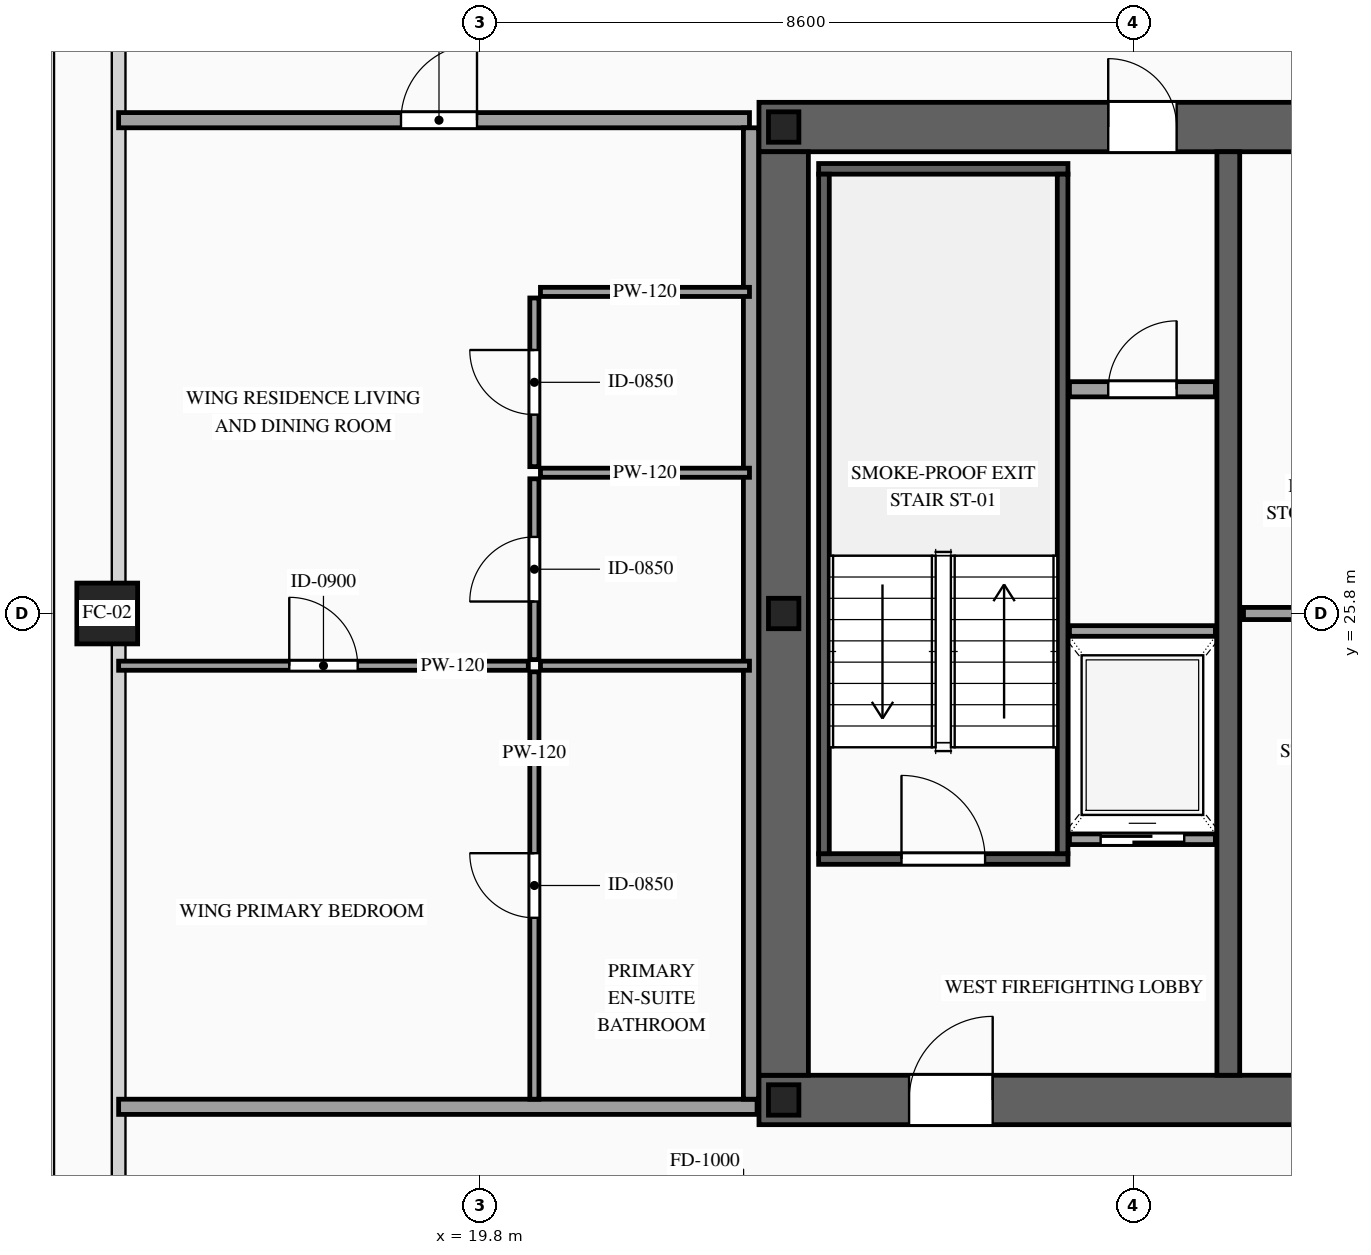
"""IFC4 building model, lengths in metres.
Left out: names, types, materials, properties, quantities, classifications, styles, units other than length and angle.
Written with IfcOpenShell. Run it as: python <this file> out.ifc"""

import sys

from ifc_helpers import new_model, si_unit, direction, frame, frame_2d, origin, origin_2d, place, context, subcontext, project, spatial, rectangle, hollow_rectangle, i_section, extrude, source, transform, mapped, element, fill, save


model = new_model("IFC4")
c1 = context("Model", 3, precision=1e-05, world=origin(), true_north=direction((0.0, 1.0)))
c2 = subcontext(c1, "Body", "Model", "MODEL_VIEW")
j1 = project(units=[si_unit("LENGTHUNIT", "METRE"), si_unit("PLANEANGLEUNIT", "RADIAN")], contexts=[c1])
p1 = place(None, origin())
s1 = spatial("IfcSite", under=j1, at=p1, CompositionType="ELEMENT")
p2 = place(p1, origin())
s2 = spatial("IfcBuilding", under=s1, at=p2, CompositionType="ELEMENT")
p3 = place(p2, frame((0.0, 0.0, 181.0)))
s3 = spatial("IfcBuildingStorey", under=s2, at=p3, CompositionType="ELEMENT", Elevation=181.0)
p4 = place(p3, frame((23.475, 19.4, 0.0), z_axis=(0.0, 0.0, 1.0), x_axis=(1.0, 0.0, 0.0)))
e1 = element("IfcWall", 1, at=p4, inside=s3, PredefinedType="SHEAR", context=c2, shape_type="SweptSolid", body=[
    extrude(rectangle(XDim=27.05, YDim=0.65, at=frame_2d((13.525, 0.0))), origin(), (0.0, 0.0, 1.0), 3.5),
])
p5 = place(p4, frame((1.975, 0.0, 0.0)))
e2 = element("IfcOpeningElement", 2, at=p5, cuts=e1, PredefinedType="OPENING", context=c2, shape_type="SweptSolid", body=[
    extrude(rectangle(XDim=1.1, YDim=2.2, at=frame_2d((0.55, 1.1))), frame((0.0, 0.34, 0.0), z_axis=(0.0, -1.0, 0.0), x_axis=(1.0, 0.0, 0.0)), (0.0, 0.0, 1.0), 0.68),
])
p6 = place(p4, frame((9.875, 0.0, 0.0)))
e3 = element("IfcOpeningElement", 3, at=p6, cuts=e1, PredefinedType="OPENING", context=c2, shape_type="SweptSolid", body=[
    extrude(rectangle(XDim=1.1, YDim=2.2, at=frame_2d((0.55, 1.1))), frame((0.0, 0.34, 0.0), z_axis=(0.0, -1.0, 0.0), x_axis=(1.0, 0.0, 0.0)), (0.0, 0.0, 1.0), 0.68),
])
p7 = place(p4, frame((23.075, 0.0, 0.0)))
e4 = element("IfcOpeningElement", 4, at=p7, cuts=e1, PredefinedType="OPENING", context=c2, shape_type="SweptSolid", body=[
    extrude(rectangle(XDim=1.1, YDim=2.2, at=frame_2d((0.55, 1.1))), frame((0.0, 0.34, 0.0), z_axis=(0.0, -1.0, 0.0), x_axis=(1.0, 0.0, 0.0)), (0.0, 0.0, 1.0), 0.68),
])
p8 = place(p4, frame((19.695, 0.0, 0.0)))
e5 = element("IfcOpeningElement", 5, at=p8, cuts=e1, PredefinedType="OPENING", context=c2, shape_type="SweptSolid", body=[
    extrude(rectangle(XDim=0.9, YDim=2.15, at=frame_2d((0.45, 1.075))), frame((0.0, 0.34, 0.0), z_axis=(0.0, -1.0, 0.0), x_axis=(1.0, 0.0, 0.0)), (0.0, 0.0, 1.0), 0.68),
])
p9 = place(p4, frame((18.255, 0.0, 0.0)))
e6 = element("IfcOpeningElement", 6, at=p9, cuts=e1, PredefinedType="OPENING", context=c2, shape_type="SweptSolid", body=[
    extrude(rectangle(XDim=0.9, YDim=2.15, at=frame_2d((0.45, 1.075))), frame((0.0, 0.34, 0.0), z_axis=(0.0, -1.0, 0.0), x_axis=(1.0, 0.0, 0.0)), (0.0, 0.0, 1.0), 0.68),
])
p10 = place(p3, frame((23.475, 32.2, 0.0), z_axis=(0.0, 0.0, 1.0), x_axis=(1.0, 0.0, 0.0)))
e7 = element("IfcWall", 7, at=p10, inside=s3, PredefinedType="SHEAR", context=c2, shape_type="SweptSolid", body=[
    extrude(rectangle(XDim=27.05, YDim=0.65, at=frame_2d((13.525, 0.0))), origin(), (0.0, 0.0, 1.0), 3.5),
])
p11 = place(p10, frame((4.595, 0.0, 0.0)))
e8 = element("IfcOpeningElement", 8, at=p11, cuts=e7, PredefinedType="OPENING", context=c2, shape_type="SweptSolid", body=[
    extrude(rectangle(XDim=0.9, YDim=2.15, at=frame_2d((0.45, 1.075))), frame((0.0, 0.34, 0.0), z_axis=(0.0, -1.0, 0.0), x_axis=(1.0, 0.0, 0.0)), (0.0, 0.0, 1.0), 0.68),
])
p12 = place(p10, frame((9.875, 0.0, 0.0)))
e9 = element("IfcOpeningElement", 9, at=p12, cuts=e7, PredefinedType="OPENING", context=c2, shape_type="SweptSolid", body=[
    extrude(rectangle(XDim=1.1, YDim=2.2, at=frame_2d((0.55, 1.1))), frame((0.0, 0.34, 0.0), z_axis=(0.0, -1.0, 0.0), x_axis=(1.0, 0.0, 0.0)), (0.0, 0.0, 1.0), 0.68),
])
p13 = place(p10, frame((15.725, 0.0, 0.0)))
e10 = element("IfcOpeningElement", 10, at=p13, cuts=e7, PredefinedType="OPENING", context=c2, shape_type="SweptSolid", body=[
    extrude(rectangle(XDim=1.1, YDim=2.2, at=frame_2d((0.55, 1.1))), frame((0.0, 0.34, 0.0), z_axis=(0.0, -1.0, 0.0), x_axis=(1.0, 0.0, 0.0)), (0.0, 0.0, 1.0), 0.68),
])
p14 = place(p10, frame((19.695, 0.0, 0.0)))
e11 = element("IfcOpeningElement", 11, at=p14, cuts=e7, PredefinedType="OPENING", context=c2, shape_type="SweptSolid", body=[
    extrude(rectangle(XDim=0.9, YDim=2.15, at=frame_2d((0.45, 1.075))), frame((0.0, 0.34, 0.0), z_axis=(0.0, -1.0, 0.0), x_axis=(1.0, 0.0, 0.0)), (0.0, 0.0, 1.0), 0.68),
])
m1 = source(origin(), c2, "Body", "SweptSolid", [
    extrude(rectangle(XDim=12.15, YDim=0.65, at=frame_2d((6.075, 0.0))), origin(), (0.0, 0.0, 1.0), 3.5),
])
p15 = place(p3, frame((23.8, 19.725, 0.0), z_axis=(0.0, 0.0, 1.0), x_axis=(0.0, 1.0, 0.0)))
e12 = element("IfcWall", 12, at=p15, inside=s3, PredefinedType="SHEAR", context=c2, shape_type="MappedRepresentation", body=[
    mapped(m1, transform((0.0, 0.0, 0.0), scale=1.0)),
])
m2 = source(origin(), c2, "Body", "SweptSolid", [
    extrude(rectangle(XDim=12.15, YDim=0.3, at=frame_2d((6.075, 0.0))), origin(), (0.0, 0.0, 1.0), 3.5),
])
p16 = place(p3, frame((29.65, 19.725, 0.0), z_axis=(0.0, 0.0, 1.0), x_axis=(0.0, 1.0, 0.0)))
e13 = element("IfcWall", 13, at=p16, inside=s3, PredefinedType="SOLIDWALL", context=c2, shape_type="MappedRepresentation", body=[
    mapped(m2, transform((0.0, 0.0, 0.0), scale=1.0)),
])
m3 = source(origin(), c2, "Body", "SweptSolid", [
    extrude(i_section(OverallWidth=0.4, OverallDepth=0.4, WebThickness=0.013, FlangeThickness=0.021, at=origin_2d()), origin(), (0.0, 0.0, 1.0), 3.5),
])
for number, where, z_axis, x_axis in (
    (14, (23.8, 19.4, 0.0), (0.0, 0.0, 1.0), (1.0, 0.0, 0.0)),
    (15, (23.8, 25.8, 0.0), (0.0, 0.0, 1.0), (1.0, 0.0, 0.0)),
    (16, (23.8, 32.2, 0.0), (0.0, 0.0, 1.0), (1.0, 0.0, 0.0)),
):
    element("IfcColumn", number, at=place(p3, frame(where, z_axis=z_axis, x_axis=x_axis)), inside=s3, PredefinedType="COLUMN", context=c2, shape_type="MappedRepresentation", body=[
        mapped(m3, transform((0.0, 0.0, 0.0), scale=1.0)),
    ])
m4 = source(origin(), c2, "Body", "SweptSolid", [
    extrude(hollow_rectangle(XDim=0.8, YDim=0.8, WallThickness=0.036, at=origin_2d()), origin(), (0.0, 0.0, 1.0), 3.5),
])
p17 = place(p3, frame((14.9, 25.8, 0.0), z_axis=(0.0, 0.0, 1.0), x_axis=(1.0, 0.0, 0.0)))
e17 = element("IfcColumn", 17, at=p17, inside=s3, PredefinedType="COLUMN", context=c2, shape_type="MappedRepresentation", body=[
    mapped(m4, transform((0.0, 0.0, 0.0), scale=1.0)),
])
p18 = place(p3, frame((27.56, 22.83, 0.0), z_axis=(0.0, 0.0, 1.0), x_axis=(1.0, 0.0, 0.0)))
e18 = element("IfcWall", 18, at=p18, inside=s3, PredefinedType="SOLIDWALL", context=c2, shape_type="SweptSolid", body=[
    extrude(rectangle(XDim=1.92, YDim=0.14, at=frame_2d((0.96, 0.0))), origin(), (0.0, 0.0, 1.0), 3.28),
])
p19 = place(p18, frame((0.41, 0.0, 0.0)))
e19 = element("IfcOpeningElement", 19, at=p19, cuts=e18, PredefinedType="OPENING", context=c2, shape_type="SweptSolid", body=[
    extrude(rectangle(XDim=1.1, YDim=2.2, at=frame_2d((0.55, 1.1))), frame((0.0, 0.085, 0.0), z_axis=(0.0, -1.0, 0.0), x_axis=(1.0, 0.0, 0.0)), (0.0, 0.0, 1.0), 0.17),
])
m5 = source(origin(), c2, "Body", "SweptSolid", [
    extrude(rectangle(XDim=1.92, YDim=0.14, at=frame_2d((0.96, 0.0))), origin(), (0.0, 0.0, 1.0), 3.28),
])
p20 = place(p3, frame((27.56, 25.57, 0.0), z_axis=(0.0, 0.0, 1.0), x_axis=(1.0, 0.0, 0.0)))
e20 = element("IfcWall", 20, at=p20, inside=s3, PredefinedType="SOLIDWALL", context=c2, shape_type="MappedRepresentation", body=[
    mapped(m5, transform((0.0, 0.0, 0.0), scale=1.0)),
])
p21 = place(p3, frame((24.26, 22.57, 0.0), z_axis=(0.0, 0.0, 1.0), x_axis=(1.0, 0.0, 0.0)))
e21 = element("IfcWall", 21, at=p21, inside=s3, PredefinedType="SOLIDWALL", context=c2, shape_type="SweptSolid", body=[
    extrude(rectangle(XDim=3.28, YDim=0.14, at=frame_2d((1.64, 0.0))), origin(), (0.0, 0.0, 1.0), 3.28),
])
p22 = place(p21, frame((1.09, 0.0, 0.0)))
e22 = element("IfcOpeningElement", 22, at=p22, cuts=e21, PredefinedType="OPENING", context=c2, shape_type="SweptSolid", body=[
    extrude(rectangle(XDim=1.1, YDim=2.2, at=frame_2d((0.55, 1.1))), frame((0.0, 0.085, 0.0), z_axis=(0.0, -1.0, 0.0), x_axis=(1.0, 0.0, 0.0)), (0.0, 0.0, 1.0), 0.17),
])
m6 = source(origin(), c2, "Body", "SweptSolid", [
    extrude(rectangle(XDim=3.28, YDim=0.14, at=frame_2d((1.64, 0.0))), origin(), (0.0, 0.0, 1.0), 3.28),
])
p23 = place(p3, frame((24.26, 31.65, 0.0), z_axis=(0.0, 0.0, 1.0), x_axis=(1.0, 0.0, 0.0)))
e23 = element("IfcWall", 23, at=p23, inside=s3, PredefinedType="SOLIDWALL", context=c2, shape_type="MappedRepresentation", body=[
    mapped(m6, transform((0.0, 0.0, 0.0), scale=1.0)),
])
m7 = source(origin(), c2, "Body", "SweptSolid", [
    extrude(rectangle(XDim=8.94, YDim=0.14, at=frame_2d((4.47, 0.0))), origin(), (0.0, 0.0, 1.0), 3.28),
])
for number, where, z_axis, x_axis in (
    (24, (24.33, 22.64, 0.0), (0.0, 0.0, 1.0), (0.0, 1.0, 0.0)),
    (25, (27.47, 22.64, 0.0), (0.0, 0.0, 1.0), (0.0, 1.0, 0.0)),
):
    element("IfcWall", number, at=place(p3, frame(where, z_axis=z_axis, x_axis=x_axis)), inside=s3, PredefinedType="SOLIDWALL", context=c2, shape_type="MappedRepresentation", body=[
        mapped(m7, transform((0.0, 0.0, 0.0), scale=1.0)),
    ])
p24 = place(p3, frame((27.56, 28.75, 0.0), z_axis=(0.0, 0.0, 1.0), x_axis=(1.0, 0.0, 0.0)))
e26 = element("IfcWall", 26, at=p24, inside=s3, PredefinedType="PARTITIONING", context=c2, shape_type="SweptSolid", body=[
    extrude(rectangle(XDim=1.92, YDim=0.2, at=frame_2d((0.96, 0.0))), origin(), (0.0, 0.0, 1.0), 3.28),
])
p25 = place(p24, frame((0.51, 0.0, 0.0)))
e27 = element("IfcOpeningElement", 27, at=p25, cuts=e26, PredefinedType="OPENING", context=c2, shape_type="SweptSolid", body=[
    extrude(rectangle(XDim=0.9, YDim=2.15, at=frame_2d((0.45, 1.075))), frame((0.0, 0.115, 0.0), z_axis=(0.0, -1.0, 0.0), x_axis=(1.0, 0.0, 0.0)), (0.0, 0.0, 1.0), 0.23),
])
m8 = source(origin(), c2, "Body", "SweptSolid", [
    extrude(rectangle(XDim=2.47, YDim=0.16, at=frame_2d((1.235, 0.0))), origin(), (0.0, 0.0, 1.0), 3.28),
])
p26 = place(p3, frame((29.85, 25.8, 0.0), z_axis=(0.0, 0.0, 1.0), x_axis=(1.0, 0.0, 0.0)))
e28 = element("IfcWall", 28, at=p26, inside=s3, PredefinedType="PARTITIONING", context=c2, shape_type="MappedRepresentation", body=[
    mapped(m8, transform((0.0, 0.0, 0.0), scale=1.0)),
])
p27 = place(p3, frame((15.05, 32.29, 0.0), z_axis=(0.0, 0.0, 1.0), x_axis=(1.0, 0.0, 0.0)))
e29 = element("IfcWall", 29, at=p27, inside=s3, PredefinedType="PARTITIONING", context=c2, shape_type="SweptSolid", body=[
    extrude(rectangle(XDim=8.3, YDim=0.2, at=frame_2d((4.15, 0.0))), origin(), (0.0, 0.0, 1.0), 2.775),
])
p28 = place(p27, frame((3.715, 0.0, 0.0)))
e30 = element("IfcOpeningElement", 30, at=p28, cuts=e29, PredefinedType="OPENING", context=c2, shape_type="SweptSolid", body=[
    extrude(rectangle(XDim=1.0, YDim=2.2, at=frame_2d((0.5, 1.1))), frame((0.0, 0.115, 0.0), z_axis=(0.0, -1.0, 0.0), x_axis=(1.0, 0.0, 0.0)), (0.0, 0.0, 1.0), 0.23),
])
m9 = source(origin(), c2, "Body", "SweptSolid", [
    extrude(rectangle(XDim=8.4, YDim=0.2, at=frame_2d((4.2, 0.0))), origin(), (0.0, 0.0, 1.0), 2.775),
])
p29 = place(p3, frame((15.05, 19.31, 0.0), z_axis=(0.0, 0.0, 1.0), x_axis=(1.0, 0.0, 0.0)))
e31 = element("IfcWall", 31, at=p29, inside=s3, PredefinedType="PARTITIONING", context=c2, shape_type="MappedRepresentation", body=[
    mapped(m9, transform((0.0, 0.0, 0.0), scale=1.0)),
])
m10 = source(origin(), c2, "Body", "SweptSolid", [
    extrude(rectangle(XDim=12.78, YDim=0.2, at=frame_2d((6.39, 0.0))), origin(), (0.0, 0.0, 1.0), 3.28),
])
p30 = place(p3, frame((23.37, 19.41, 0.0), z_axis=(0.0, 0.0, 1.0), x_axis=(0.0, 1.0, 0.0)))
e32 = element("IfcWall", 32, at=p30, inside=s3, PredefinedType="PARTITIONING", context=c2, shape_type="MappedRepresentation", body=[
    mapped(m10, transform((0.0, 0.0, 0.0), scale=1.0)),
])
m11 = source(origin(), c2, "Body", "SweptSolid", [
    extrude(rectangle(XDim=2.75, YDim=0.12, at=frame_2d((1.375, 0.0))), origin(), (0.0, 0.0, 1.0), 3.28),
])
for number, where, z_axis, x_axis in (
    (33, (20.6, 25.113, 0.0), (0.0, 0.0, 1.0), (1.0, 0.0, 0.0)),
    (34, (20.6, 27.652, 0.0), (0.0, 0.0, 1.0), (1.0, 0.0, 0.0)),
):
    element("IfcWall", number, at=place(p3, frame(where, z_axis=z_axis, x_axis=x_axis)), inside=s3, PredefinedType="PARTITIONING", context=c2, shape_type="MappedRepresentation", body=[
        mapped(m11, transform((0.0, 0.0, 0.0), scale=1.0)),
    ])
p31 = place(p3, frame((20.52, 25.193, 0.0), z_axis=(0.0, 0.0, 1.0), x_axis=(0.0, 1.0, 0.0)))
e35 = element("IfcWall", 35, at=p31, inside=s3, PredefinedType="PARTITIONING", context=c2, shape_type="SweptSolid", body=[
    extrude(rectangle(XDim=2.379, YDim=0.12, at=frame_2d((1.189, 0.0))), origin(), (0.0, 0.0, 1.0), 3.28),
])
p32 = place(p31, frame((0.764, 0.0, 0.0)))
e36 = element("IfcOpeningElement", 36, at=p32, cuts=e35, PredefinedType="OPENING", context=c2, shape_type="SweptSolid", body=[
    extrude(rectangle(XDim=0.85, YDim=2.1, at=frame_2d((0.425, 1.05))), frame((0.0, 0.075, 0.0), z_axis=(0.0, -1.0, 0.0), x_axis=(1.0, 0.0, 0.0)), (0.0, 0.0, 1.0), 0.15),
])
p33 = place(p3, frame((20.6, 30.031, 0.0), z_axis=(0.0, 0.0, 1.0), x_axis=(1.0, 0.0, 0.0)))
e37 = element("IfcWall", 37, at=p33, inside=s3, PredefinedType="PARTITIONING", context=c2, shape_type="MappedRepresentation", body=[
    mapped(m11, transform((0.0, 0.0, 0.0), scale=1.0)),
])
p34 = place(p3, frame((20.52, 27.732, 0.0), z_axis=(0.0, 0.0, 1.0), x_axis=(0.0, 1.0, 0.0)))
e38 = element("IfcWall", 38, at=p34, inside=s3, PredefinedType="PARTITIONING", context=c2, shape_type="SweptSolid", body=[
    extrude(rectangle(XDim=2.219, YDim=0.12, at=frame_2d((1.109, 0.0))), origin(), (0.0, 0.0, 1.0), 3.28),
])
p35 = place(p34, frame((0.685, 0.0, 0.0)))
e39 = element("IfcOpeningElement", 39, at=p35, cuts=e38, PredefinedType="OPENING", context=c2, shape_type="SweptSolid", body=[
    extrude(rectangle(XDim=0.85, YDim=2.1, at=frame_2d((0.425, 1.05))), frame((0.0, 0.075, 0.0), z_axis=(0.0, -1.0, 0.0), x_axis=(1.0, 0.0, 0.0)), (0.0, 0.0, 1.0), 0.15),
])
p36 = place(p3, frame((15.05, 25.113, 0.0), z_axis=(0.0, 0.0, 1.0), x_axis=(1.0, 0.0, 0.0)))
e40 = element("IfcWall", 40, at=p36, inside=s3, PredefinedType="PARTITIONING", context=c2, shape_type="SweptSolid", body=[
    extrude(rectangle(XDim=5.39, YDim=0.12, at=frame_2d((2.695, 0.0))), origin(), (0.0, 0.0, 1.0), 3.28),
])
p37 = place(p36, frame((2.245, 0.0, 0.0)))
e41 = element("IfcOpeningElement", 41, at=p37, cuts=e40, PredefinedType="OPENING", context=c2, shape_type="SweptSolid", body=[
    extrude(rectangle(XDim=0.9, YDim=2.15, at=frame_2d((0.45, 1.075))), frame((0.0, 0.075, 0.0), z_axis=(0.0, -1.0, 0.0), x_axis=(1.0, 0.0, 0.0)), (0.0, 0.0, 1.0), 0.15),
])
p38 = place(p3, frame((20.52, 19.41, 0.0), z_axis=(0.0, 0.0, 1.0), x_axis=(0.0, 1.0, 0.0)))
e42 = element("IfcWall", 42, at=p38, inside=s3, PredefinedType="PARTITIONING", context=c2, shape_type="SweptSolid", body=[
    extrude(rectangle(XDim=5.623, YDim=0.12, at=frame_2d((2.812, 0.0))), origin(), (0.0, 0.0, 1.0), 3.28),
])
p39 = place(p38, frame((2.386, 0.0, 0.0)))
e43 = element("IfcOpeningElement", 43, at=p39, cuts=e42, PredefinedType="OPENING", context=c2, shape_type="SweptSolid", body=[
    extrude(rectangle(XDim=0.85, YDim=2.1, at=frame_2d((0.425, 1.05))), frame((0.0, 0.075, 0.0), z_axis=(0.0, -1.0, 0.0), x_axis=(1.0, 0.0, 0.0)), (0.0, 0.0, 1.0), 0.15),
])
m12 = source(origin(), c2, "Body", "SweptSolid", [
    extrude(rectangle(XDim=1.1, YDim=2.2, at=frame_2d((0.55, 1.1))), frame((0.0, 0.025, 0.0), z_axis=(0.0, -1.0, 0.0), x_axis=(1.0, 0.0, 0.0)), (0.0, 0.0, 1.0), 0.05),
])
p40 = place(p19, origin())
e44 = element("IfcDoor", 44, at=p40, inside=s3, OperationType="SLIDING_TO_LEFT", PredefinedType="DOOR", context=c2, shape_type="MappedRepresentation", body=[
    mapped(m12, transform((0.0, 0.0, 0.0), scale=1.0)),
])
fill(e19, e44)
m13 = source(origin(), c2, "Body", "SweptSolid", [
    extrude(rectangle(XDim=1.1, YDim=2.2, at=frame_2d((0.55, 1.1))), frame((0.0, 0.025, 0.0), z_axis=(0.0, -1.0, 0.0), x_axis=(1.0, 0.0, 0.0)), (0.0, 0.0, 1.0), 0.05),
])
p41 = place(p22, origin())
e45 = element("IfcDoor", 45, at=p41, inside=s3, OperationType="SINGLE_SWING_LEFT", PredefinedType="DOOR", context=c2, shape_type="MappedRepresentation", body=[
    mapped(m13, transform((0.0, 0.0, 0.0), scale=1.0)),
])
fill(e22, e45)
p42 = place(p5, origin())
e46 = element("IfcDoor", 46, at=p42, inside=s3, OperationType="SINGLE_SWING_RIGHT", PredefinedType="DOOR", context=c2, shape_type="MappedRepresentation", body=[
    mapped(m13, transform((0.0, 0.0, 0.0), scale=1.0)),
])
fill(e2, e46)
m14 = source(origin(), c2, "Body", "SweptSolid", [
    extrude(rectangle(XDim=0.9, YDim=2.15, at=frame_2d((0.45, 1.075))), frame((0.0, 0.025, 0.0), z_axis=(0.0, -1.0, 0.0), x_axis=(1.0, 0.0, 0.0)), (0.0, 0.0, 1.0), 0.05),
])
p43 = place(p11, origin())
e47 = element("IfcDoor", 47, at=p43, inside=s3, OperationType="SINGLE_SWING_LEFT", PredefinedType="DOOR", context=c2, shape_type="MappedRepresentation", body=[
    mapped(m14, transform((0.0, 0.0, 0.0), scale=1.0)),
])
fill(e8, e47)
p44 = place(p25, origin())
e48 = element("IfcDoor", 48, at=p44, inside=s3, OperationType="SINGLE_SWING_RIGHT", PredefinedType="DOOR", context=c2, shape_type="MappedRepresentation", body=[
    mapped(m14, transform((0.0, 0.0, 0.0), scale=1.0)),
])
fill(e27, e48)
m15 = source(origin(), c2, "Body", "SweptSolid", [
    extrude(rectangle(XDim=1.0, YDim=2.2, at=frame_2d((0.5, 1.1))), frame((0.0, 0.025, 0.0), z_axis=(0.0, -1.0, 0.0), x_axis=(1.0, 0.0, 0.0)), (0.0, 0.0, 1.0), 0.05),
])
p45 = place(p28, origin())
e49 = element("IfcDoor", 49, at=p45, inside=s3, OperationType="SINGLE_SWING_RIGHT", PredefinedType="DOOR", context=c2, shape_type="MappedRepresentation", body=[
    mapped(m15, transform((0.0, 0.0, 0.0), scale=1.0)),
])
fill(e30, e49)
m16 = source(origin(), c2, "Body", "SweptSolid", [
    extrude(rectangle(XDim=0.85, YDim=2.1, at=frame_2d((0.425, 1.05))), frame((0.0, 0.025, 0.0), z_axis=(0.0, -1.0, 0.0), x_axis=(1.0, 0.0, 0.0)), (0.0, 0.0, 1.0), 0.05),
])
p46 = place(p32, origin())
e50 = element("IfcDoor", 50, at=p46, inside=s3, OperationType="SINGLE_SWING_LEFT", PredefinedType="DOOR", context=c2, shape_type="MappedRepresentation", body=[
    mapped(m16, transform((0.0, 0.0, 0.0), scale=1.0)),
])
fill(e36, e50)
p47 = place(p35, origin())
e51 = element("IfcDoor", 51, at=p47, inside=s3, OperationType="SINGLE_SWING_RIGHT", PredefinedType="DOOR", context=c2, shape_type="MappedRepresentation", body=[
    mapped(m16, transform((0.0, 0.0, 0.0), scale=1.0)),
])
fill(e39, e51)
m17 = source(origin(), c2, "Body", "SweptSolid", [
    extrude(rectangle(XDim=0.9, YDim=2.15, at=frame_2d((0.45, 1.075))), frame((0.0, 0.025, 0.0), z_axis=(0.0, -1.0, 0.0), x_axis=(1.0, 0.0, 0.0)), (0.0, 0.0, 1.0), 0.05),
])
p48 = place(p37, origin())
e52 = element("IfcDoor", 52, at=p48, inside=s3, OperationType="SINGLE_SWING_LEFT", PredefinedType="DOOR", context=c2, shape_type="MappedRepresentation", body=[
    mapped(m17, transform((0.0, 0.0, 0.0), scale=1.0)),
])
fill(e41, e52)
p49 = place(p39, origin())
e53 = element("IfcDoor", 53, at=p49, inside=s3, OperationType="SINGLE_SWING_RIGHT", PredefinedType="DOOR", context=c2, shape_type="MappedRepresentation", body=[
    mapped(m16, transform((0.0, 0.0, 0.0), scale=1.0)),
])
fill(e43, e53)
save(model, sys.argv[1])
